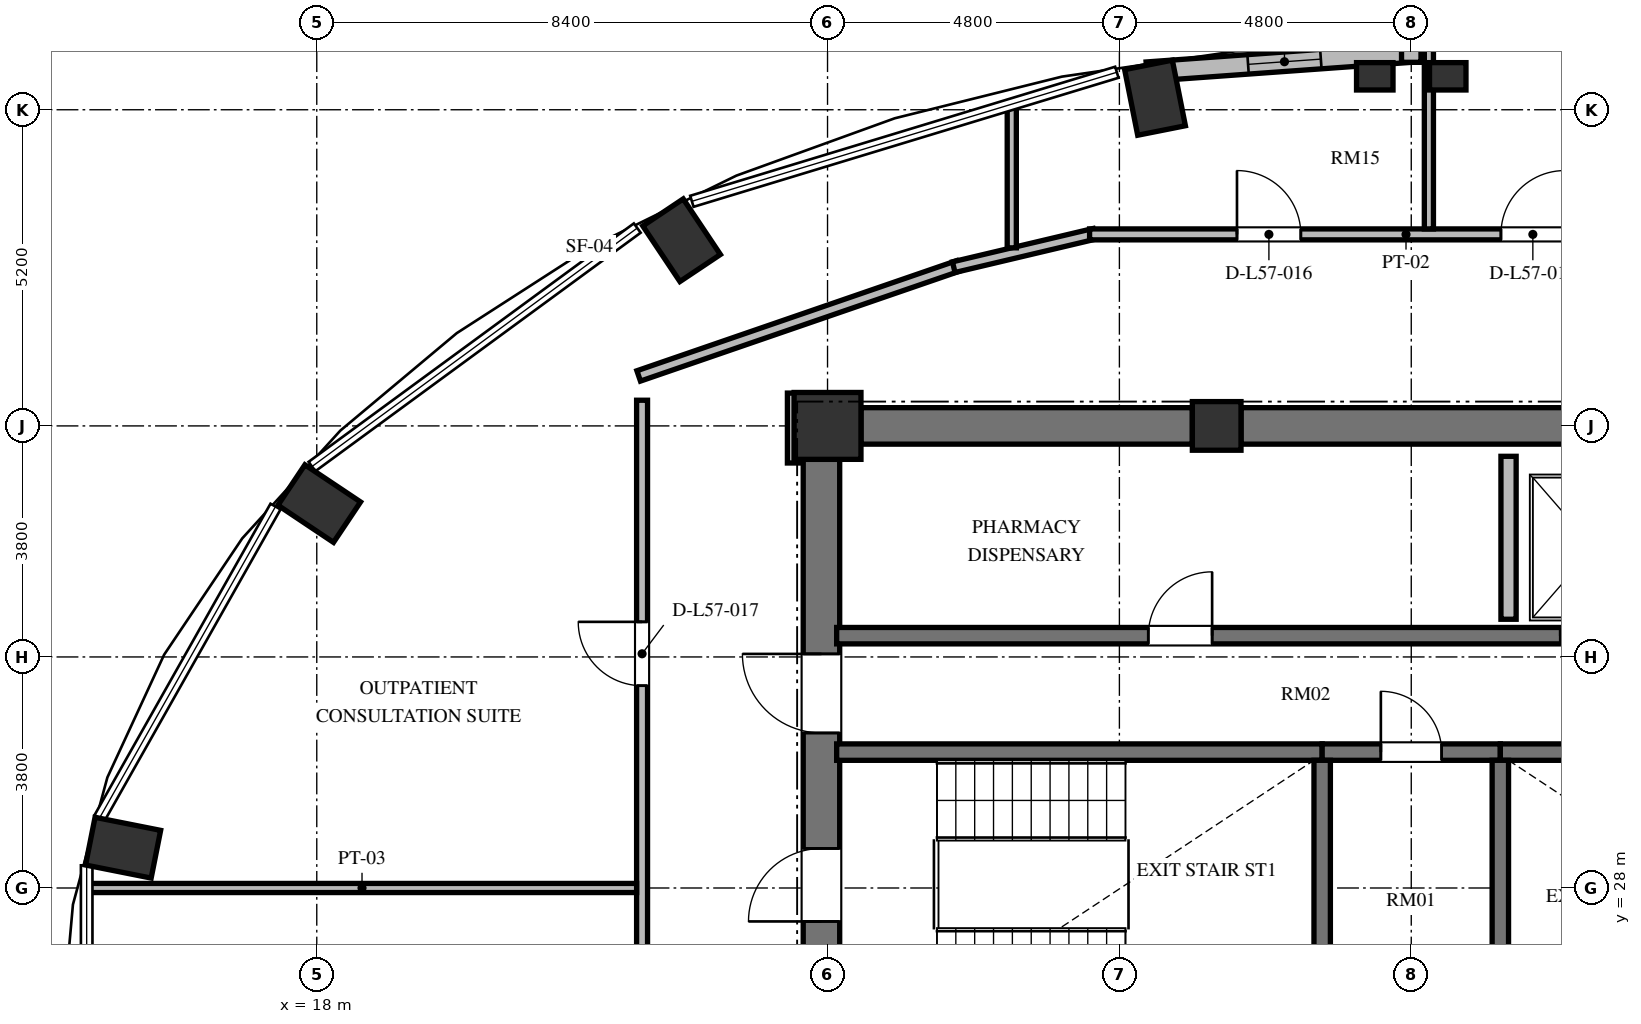
"""IFC4 building model, lengths in metres.
Left out: names, types, materials, properties, quantities, classifications, styles, units other than length and angle.
Written with IfcOpenShell. Run it as: python <this file> out.ifc"""

import sys

from ifc_helpers import new_model, si_unit, direction, frame, frame_2d, origin, origin_2d, place, context, subcontext, project, spatial, rectangle, extrude, element, fill, save


model = new_model("IFC4")
c1 = context("Model", 3, precision=1e-05, world=origin(), true_north=direction((0.0, 1.0)))
c2 = subcontext(c1, "Body", "Model", "MODEL_VIEW")
j1 = project(units=[si_unit("LENGTHUNIT", "METRE"), si_unit("PLANEANGLEUNIT", "RADIAN")], contexts=[c1])
p1 = place(None, origin())
s1 = spatial("IfcSite", under=j1, at=p1, CompositionType="ELEMENT")
p2 = place(p1, origin())
s2 = spatial("IfcBuilding", under=s1, at=p2, CompositionType="ELEMENT")
p3 = place(p2, frame((0.0, 0.0, 220.368)))
s3 = spatial("IfcBuildingStorey", under=s2, at=p3, CompositionType="ELEMENT", Elevation=220.368)
for number, where, z_axis, x_axis in (
    (1, (31.786, 40.998, 0.0), (0.0, 0.0, 1.0), (-0.195, 0.981, 0.0)),
    (2, (24.0, 38.654, 0.0), (0.0, 0.0, 1.0), (-0.556, 0.831, 0.0)),
    (3, (18.04, 34.323, 0.0), (0.0, 0.0, 1.0), (-0.831, 0.556, 0.0)),
    (4, (14.815, 28.663, 0.0), (0.0, 0.0, 1.0), (-0.981, 0.195, 0.0)),
):
    element("IfcColumn", number, at=place(p3, frame(where, z_axis=z_axis, x_axis=x_axis)), inside=s3, PredefinedType="COLUMN", context=c2, shape_type="SweptSolid", body=[
        extrude(rectangle(XDim=1.1, YDim=0.8, at=origin_2d()), origin(), (0.0, 0.0, 1.0), 3.648),
    ])
p4 = place(p3, frame((32.8, 35.6, 0.0), z_axis=(0.0, 0.0, 1.0), x_axis=(1.0, 0.0, 0.0)))
e5 = element("IfcColumn", 5, at=p4, inside=s3, PredefinedType="COLUMN", context=c2, shape_type="SweptSolid", body=[
    extrude(rectangle(XDim=0.8, YDim=0.8, at=origin_2d()), origin(), (0.0, 0.0, 1.0), 3.648),
])
p5 = place(p3, frame((26.4, 35.6, 0.0), z_axis=(0.0, 0.0, 1.0), x_axis=(1.0, 0.0, 0.0)))
e6 = element("IfcColumn", 6, at=p5, inside=s3, PredefinedType="COLUMN", context=c2, shape_type="SweptSolid", body=[
    extrude(rectangle(XDim=1.1, YDim=1.1, at=origin_2d()), origin(), (0.0, 0.0, 1.0), 3.648),
])
for number, where, z_axis, x_axis in (
    (7, (35.4, 41.35, 0.0), (0.0, 0.0, 1.0), (1.0, 0.0, 0.0)),
    (8, (36.6, 41.35, 0.0), (0.0, 0.0, 1.0), (1.0, 0.0, 0.0)),
):
    element("IfcColumn", number, at=place(p3, frame(where, z_axis=z_axis, x_axis=x_axis)), inside=s3, PredefinedType="PILASTER", context=c2, shape_type="SweptSolid", body=[
        extrude(rectangle(XDim=0.6, YDim=0.45, at=origin_2d()), origin(), (0.0, 0.0, 1.0), 3.648),
    ])
p6 = place(p3, frame((26.3, 20.95, 0.0), z_axis=(0.0, 0.0, 1.0), x_axis=(0.0, 1.0, 0.0)))
e9 = element("IfcWall", 9, at=p6, inside=s3, PredefinedType="SHEAR", context=c2, shape_type="SweptSolid", body=[
    extrude(rectangle(XDim=14.1, YDim=0.6, at=frame_2d((7.05, 0.0))), origin(), (0.0, 0.0, 1.0), 3.648),
])
p7 = place(p6, frame((6.5, 0.0, 0.0)))
e10 = element("IfcOpeningElement", 10, at=p7, cuts=e9, PredefinedType="OPENING", context=c2, shape_type="SweptSolid", body=[
    extrude(rectangle(XDim=1.2, YDim=2.15, at=frame_2d((0.6, 1.075))), frame((0.0, 0.31, 0.0), z_axis=(0.0, -1.0, 0.0), x_axis=(1.0, 0.0, 0.0)), (0.0, 0.0, 1.0), 0.62),
])
p8 = place(p6, frame((9.6, 0.0, 0.0)))
e11 = element("IfcOpeningElement", 11, at=p8, cuts=e9, PredefinedType="OPENING", context=c2, shape_type="SweptSolid", body=[
    extrude(rectangle(XDim=1.3, YDim=2.2, at=frame_2d((0.65, 1.1))), frame((0.0, 0.31, 0.0), z_axis=(0.0, -1.0, 0.0), x_axis=(1.0, 0.0, 0.0)), (0.0, 0.0, 1.0), 0.62),
])
p9 = place(p6, frame((3.26, 0.0, 0.0)))
e12 = element("IfcOpeningElement", 12, at=p9, cuts=e9, PredefinedType="OPENING", context=c2, shape_type="SweptSolid", body=[
    extrude(rectangle(XDim=1.3, YDim=2.2, at=frame_2d((0.65, 1.1))), frame((0.0, 0.31, 0.0), z_axis=(0.0, -1.0, 0.0), x_axis=(1.0, 0.0, 0.0)), (0.0, 0.0, 1.0), 0.62),
])
p10 = place(p3, frame((26.95, 35.6, 0.0), z_axis=(0.0, 0.0, 1.0), x_axis=(1.0, 0.0, 0.0)))
e13 = element("IfcWall", 13, at=p10, inside=s3, PredefinedType="SHEAR", context=c2, shape_type="SweptSolid", body=[
    extrude(rectangle(XDim=5.45, YDim=0.6, at=frame_2d((2.725, 0.0))), origin(), (0.0, 0.0, 1.0), 3.648),
])
p11 = place(p3, frame((33.2, 35.6, 0.0), z_axis=(0.0, 0.0, 1.0), x_axis=(1.0, 0.0, 0.0)))
e14 = element("IfcWall", 14, at=p11, inside=s3, PredefinedType="SHEAR", context=c2, shape_type="SweptSolid", body=[
    extrude(rectangle(XDim=5.6, YDim=0.6, at=frame_2d((2.8, 0.0))), origin(), (0.0, 0.0, 1.0), 3.648),
])
p12 = place(p3, frame((36.179, 41.753, 0.0), z_axis=(0.0, 0.0, 1.0), x_axis=(-0.997408782787, -0.071942477163, 0.0)))
e15 = element("IfcWall", 15, at=p12, inside=s3, PredefinedType="SOLIDWALL", context=c2, shape_type="SweptSolid", body=[
    extrude(rectangle(XDim=4.541, YDim=0.32, at=frame_2d((2.27, 0.0))), origin(), (0.0, 0.0, 1.0), 3.448),
])
p13 = place(p12, frame((1.67, 0.0, 0.85)))
e16 = element("IfcOpeningElement", 16, at=p13, cuts=e15, PredefinedType="OPENING", context=c2, shape_type="SweptSolid", body=[
    extrude(rectangle(XDim=1.2, YDim=1.8, at=frame_2d((0.6, 0.9))), frame((0.0, 0.17, 0.0), z_axis=(0.0, -1.0, 0.0), x_axis=(1.0, 0.0, 0.0)), (0.0, 0.0, 1.0), 0.34),
])
p14 = place(p3, frame((36.0, 46.7, 0.0), z_axis=(0.0, 0.0, 1.0), x_axis=(0.0, -1.0, 0.0)))
e17 = element("IfcWall", 17, at=p14, inside=s3, PredefinedType="SOLIDWALL", context=c2, shape_type="SweptSolid", body=[
    extrude(rectangle(XDim=5.12, YDim=0.32, at=frame_2d((2.56, 0.0))), origin(), (0.0, 0.0, 1.0), 3.448),
])
p15 = place(p14, frame((1.36, 0.0, 0.84)))
e18 = element("IfcOpeningElement", 18, at=p15, cuts=e17, PredefinedType="OPENING", context=c2, shape_type="SweptSolid", body=[
    extrude(rectangle(XDim=2.4, YDim=2.04, at=frame_2d((1.2, 1.02))), frame((0.0, 0.17, 0.0), z_axis=(0.0, -1.0, 0.0), x_axis=(1.0, 0.0, 0.0)), (0.0, 0.0, 1.0), 0.34),
])
p16 = place(p3, frame((26.55, 30.235, 0.0), z_axis=(0.0, 0.0, 1.0), x_axis=(1.0, 0.0, 0.0)))
e19 = element("IfcWall", 19, at=p16, inside=s3, PredefinedType="SHEAR", context=c2, shape_type="SweptSolid", body=[
    extrude(rectangle(XDim=7.985, YDim=0.27, at=frame_2d((3.992, 0.0))), origin(), (0.0, 0.0, 1.0), 3.648),
])
p17 = place(p3, frame((34.535, 30.235, 0.0), z_axis=(0.0, 0.0, 1.0), x_axis=(1.0, 0.0, 0.0)))
e20 = element("IfcWall", 20, at=p17, inside=s3, PredefinedType="SHEAR", context=c2, shape_type="SweptSolid", body=[
    extrude(rectangle(XDim=2.93, YDim=0.27, at=frame_2d((1.465, 0.0))), origin(), (0.0, 0.0, 1.0), 3.648),
])
p18 = place(p17, frame((0.965, 0.0, 0.0)))
e21 = element("IfcOpeningElement", 21, at=p18, cuts=e20, PredefinedType="OPENING", context=c2, shape_type="SweptSolid", body=[
    extrude(rectangle(XDim=1.0, YDim=2.1, at=frame_2d((0.5, 1.05))), frame((0.0, 0.145, 0.0), z_axis=(0.0, -1.0, 0.0), x_axis=(1.0, 0.0, 0.0)), (0.0, 0.0, 1.0), 0.29),
])
p19 = place(p3, frame((37.465, 30.235, 0.0), z_axis=(0.0, 0.0, 1.0), x_axis=(1.0, 0.0, 0.0)))
e22 = element("IfcWall", 22, at=p19, inside=s3, PredefinedType="SHEAR", context=c2, shape_type="SweptSolid", body=[
    extrude(rectangle(XDim=7.985, YDim=0.27, at=frame_2d((3.992, 0.0))), origin(), (0.0, 0.0, 1.0), 3.648),
])
p20 = place(p19, frame((6.455, 0.0, 0.0)))
e23 = element("IfcOpeningElement", 23, at=p20, cuts=e22, PredefinedType="OPENING", context=c2, shape_type="SweptSolid", body=[
    extrude(rectangle(XDim=1.2, YDim=2.15, at=frame_2d((0.6, 1.075))), frame((0.0, 0.145, 0.0), z_axis=(0.0, -1.0, 0.0), x_axis=(1.0, 0.0, 0.0)), (0.0, 0.0, 1.0), 0.29),
])
for number, where, z_axis, x_axis in (
    (24, (34.535, 26.02, 0.0), (0.0, 0.0, 1.0), (0.0, 1.0, 0.0)),
    (25, (37.465, 26.02, 0.0), (0.0, 0.0, 1.0), (0.0, 1.0, 0.0)),
):
    element("IfcWall", number, at=place(p3, frame(where, z_axis=z_axis, x_axis=x_axis)), inside=s3, PredefinedType="SHEAR", context=c2, shape_type="SweptSolid", body=[
        extrude(rectangle(XDim=4.08, YDim=0.27, at=frame_2d((2.04, 0.0))), origin(), (0.0, 0.0, 1.0), 3.648),
    ])
p21 = place(p3, frame((26.55, 32.15, 0.0), z_axis=(0.0, 0.0, 1.0), x_axis=(1.0, 0.0, 0.0)))
e26 = element("IfcWall", 26, at=p21, inside=s3, PredefinedType="SHEAR", context=c2, shape_type="SweptSolid", body=[
    extrude(rectangle(XDim=16.4, YDim=0.27, at=frame_2d((8.2, 0.0))), origin(), (0.0, 0.0, 1.0), 3.648),
])
p22 = place(p21, frame((5.125, 0.0, 0.0)))
e27 = element("IfcOpeningElement", 27, at=p22, cuts=e26, PredefinedType="OPENING", context=c2, shape_type="SweptSolid", body=[
    extrude(rectangle(XDim=1.05, YDim=2.15, at=frame_2d((0.525, 1.075))), frame((0.0, 0.145, 0.0), z_axis=(0.0, -1.0, 0.0), x_axis=(1.0, 0.0, 0.0)), (0.0, 0.0, 1.0), 0.29),
])
p23 = place(p21, frame((11.9, 0.0, 0.0)))
e28 = element("IfcOpeningElement", 28, at=p23, cuts=e26, PredefinedType="OPENING", context=c2, shape_type="SweptSolid", body=[
    extrude(rectangle(XDim=1.1, YDim=2.2, at=frame_2d((0.55, 1.1))), frame((0.0, 0.145, 0.0), z_axis=(0.0, -1.0, 0.0), x_axis=(1.0, 0.0, 0.0)), (0.0, 0.0, 1.0), 0.29),
])
p24 = place(p21, frame((14.5, 0.0, 0.0)))
e29 = element("IfcOpeningElement", 29, at=p24, cuts=e26, PredefinedType="OPENING", context=c2, shape_type="SweptSolid", body=[
    extrude(rectangle(XDim=1.1, YDim=2.2, at=frame_2d((0.55, 1.1))), frame((0.0, 0.145, 0.0), z_axis=(0.0, -1.0, 0.0), x_axis=(1.0, 0.0, 0.0)), (0.0, 0.0, 1.0), 0.29),
])
p25 = place(p3, frame((37.6, 32.42, 0.0), z_axis=(0.0, 0.0, 1.0), x_axis=(0.0, 1.0, 0.0)))
e30 = element("IfcWall", 30, at=p25, inside=s3, PredefinedType="SOLIDWALL", context=c2, shape_type="SweptSolid", body=[
    extrude(rectangle(XDim=2.68, YDim=0.25, at=frame_2d((1.34, 0.0))), origin(), (0.0, 0.0, 1.0), 3.448),
])
p26 = place(p3, frame((23.294, 36.422, 0.0), z_axis=(0.0, 0.0, 1.0), x_axis=(0.945493277461, 0.325641616316, 0.0)))
e31 = element("IfcWall", 31, at=p26, inside=s3, PredefinedType="PARTITIONING", context=c2, shape_type="SweptSolid", body=[
    extrude(rectangle(XDim=5.562, YDim=0.18, at=frame_2d((2.781, 0.0))), origin(), (0.0, 0.0, 1.0), 3.073),
])
p27 = place(p3, frame((28.476, 38.211, 0.0), z_axis=(0.0, 0.0, 1.0), x_axis=(0.973030562203, 0.230676234189, 0.0)))
e32 = element("IfcWall", 32, at=p27, inside=s3, PredefinedType="PARTITIONING", context=c2, shape_type="SweptSolid", body=[
    extrude(rectangle(XDim=2.377, YDim=0.18, at=frame_2d((1.188, 0.0))), origin(), (0.0, 0.0, 1.0), 3.448),
])
p28 = place(p3, frame((30.71, 38.75, 0.0), z_axis=(0.0, 0.0, 1.0), x_axis=(1.0, 0.0, 0.0)))
e33 = element("IfcWall", 33, at=p28, inside=s3, PredefinedType="PARTITIONING", context=c2, shape_type="SweptSolid", body=[
    extrude(rectangle(XDim=20.815, YDim=0.18, at=frame_2d((10.408, 0.0))), origin(), (0.0, 0.0, 1.0), 3.073),
])
p29 = place(p28, frame((17.654, 0.0, 0.0)))
e34 = element("IfcOpeningElement", 34, at=p29, cuts=e33, PredefinedType="OPENING", context=c2, shape_type="SweptSolid", body=[
    extrude(rectangle(XDim=1.05, YDim=2.15, at=frame_2d((0.525, 1.075))), frame((0.0, 0.1, 0.0), z_axis=(0.0, -1.0, 0.0), x_axis=(1.0, 0.0, 0.0)), (0.0, 0.0, 1.0), 0.2),
])
p30 = place(p28, frame((13.62, 0.0, 0.0)))
e35 = element("IfcOpeningElement", 35, at=p30, cuts=e33, PredefinedType="OPENING", context=c2, shape_type="SweptSolid", body=[
    extrude(rectangle(XDim=1.05, YDim=2.15, at=frame_2d((0.525, 1.075))), frame((0.0, 0.1, 0.0), z_axis=(0.0, -1.0, 0.0), x_axis=(1.0, 0.0, 0.0)), (0.0, 0.0, 1.0), 0.2),
])
p31 = place(p28, frame((10.19, 0.0, 0.0)))
e36 = element("IfcOpeningElement", 36, at=p31, cuts=e33, PredefinedType="OPENING", context=c2, shape_type="SweptSolid", body=[
    extrude(rectangle(XDim=1.05, YDim=2.15, at=frame_2d((0.525, 1.075))), frame((0.0, 0.1, 0.0), z_axis=(0.0, -1.0, 0.0), x_axis=(1.0, 0.0, 0.0)), (0.0, 0.0, 1.0), 0.2),
])
p32 = place(p28, frame((6.765, 0.0, 0.0)))
e37 = element("IfcOpeningElement", 37, at=p32, cuts=e33, PredefinedType="OPENING", context=c2, shape_type="SweptSolid", body=[
    extrude(rectangle(XDim=1.05, YDim=2.15, at=frame_2d((0.525, 1.075))), frame((0.0, 0.1, 0.0), z_axis=(0.0, -1.0, 0.0), x_axis=(1.0, 0.0, 0.0)), (0.0, 0.0, 1.0), 0.2),
])
p33 = place(p28, frame((2.424, 0.0, 0.0)))
e38 = element("IfcOpeningElement", 38, at=p33, cuts=e33, PredefinedType="OPENING", context=c2, shape_type="SweptSolid", body=[
    extrude(rectangle(XDim=1.05, YDim=2.15, at=frame_2d((0.525, 1.075))), frame((0.0, 0.1, 0.0), z_axis=(0.0, -1.0, 0.0), x_axis=(1.0, 0.0, 0.0)), (0.0, 0.0, 1.0), 0.2),
])
p34 = place(p3, frame((25.83, 36.14, 0.0), z_axis=(0.0, 0.0, 1.0), x_axis=(0.0, -1.0, 0.0)))
e39 = element("IfcWall", 39, at=p34, inside=s3, PredefinedType="PARTITIONING", context=c2, shape_type="SweptSolid", body=[
    extrude(rectangle(XDim=1.15, YDim=0.18, at=frame_2d((0.575, 0.0))), origin(), (0.0, 0.0, 1.0), 3.448),
])
p35 = place(p3, frame((23.35, 19.98, 0.0), z_axis=(0.0, 0.0, 1.0), x_axis=(0.0, 1.0, 0.0)))
e40 = element("IfcWall", 40, at=p35, inside=s3, PredefinedType="PARTITIONING", context=c2, shape_type="SweptSolid", body=[
    extrude(rectangle(XDim=16.042, YDim=0.18, at=frame_2d((8.021, 0.0))), origin(), (0.0, 0.0, 1.0), 3.448),
])
p36 = place(p35, frame((3.469, 0.0, 0.0)))
e41 = element("IfcOpeningElement", 41, at=p36, cuts=e40, PredefinedType="OPENING", context=c2, shape_type="SweptSolid", body=[
    extrude(rectangle(XDim=1.4, YDim=2.2, at=frame_2d((0.7, 1.1))), frame((0.0, 0.1, 0.0), z_axis=(0.0, -1.0, 0.0), x_axis=(1.0, 0.0, 0.0)), (0.0, 0.0, 1.0), 0.2),
])
p37 = place(p35, frame((11.347, 0.0, 0.0)))
e42 = element("IfcOpeningElement", 42, at=p37, cuts=e40, PredefinedType="OPENING", context=c2, shape_type="SweptSolid", body=[
    extrude(rectangle(XDim=1.05, YDim=2.15, at=frame_2d((0.525, 1.075))), frame((0.0, 0.1, 0.0), z_axis=(0.0, -1.0, 0.0), x_axis=(1.0, 0.0, 0.0)), (0.0, 0.0, 1.0), 0.2),
])
p38 = place(p3, frame((14.228, 28.0, 0.0), z_axis=(0.0, 0.0, 1.0), x_axis=(1.0, 0.0, 0.0)))
e43 = element("IfcWall", 43, at=p38, inside=s3, PredefinedType="PARTITIONING", context=c2, shape_type="SweptSolid", body=[
    extrude(rectangle(XDim=9.032, YDim=0.15, at=frame_2d((4.516, 0.0))), origin(), (0.0, 0.0, 1.0), 3.448),
])
p39 = place(p3, frame((29.43, 38.529, 0.0), z_axis=(0.0, 0.0, 1.0), x_axis=(0.0, 1.0, 0.0)))
e44 = element("IfcWall", 44, at=p39, inside=s3, PredefinedType="PARTITIONING", context=c2, shape_type="SweptSolid", body=[
    extrude(rectangle(XDim=2.346, YDim=0.15, at=frame_2d((1.173, 0.0))), origin(), (0.0, 0.0, 1.0), 3.448),
])
p40 = place(p3, frame((36.29, 38.84, 0.0), z_axis=(0.0, 0.0, 1.0), x_axis=(0.0, 1.0, 0.0)))
e45 = element("IfcWall", 45, at=p40, inside=s3, PredefinedType="PARTITIONING", context=c2, shape_type="SweptSolid", body=[
    extrude(rectangle(XDim=7.647, YDim=0.15, at=frame_2d((3.824, 0.0))), origin(), (0.0, 0.0, 1.0), 3.448),
])
p41 = place(p13, origin())
e46 = element("IfcWindow", 46, at=p41, inside=s3, PartitioningType="SINGLE_PANEL", PredefinedType="WINDOW", context=c2, shape_type="SweptSolid", body=[
    extrude(rectangle(XDim=1.2, YDim=1.8, at=frame_2d((0.6, 0.9))), frame((0.0, 0.03, 0.0), z_axis=(0.0, -1.0, 0.0), x_axis=(1.0, 0.0, 0.0)), (0.0, 0.0, 1.0), 0.06),
])
fill(e16, e46)
p42 = place(p7, origin())
e47 = element("IfcDoor", 47, at=p42, inside=s3, OperationType="SINGLE_SWING_LEFT", PredefinedType="DOOR", context=c2, shape_type="SweptSolid", body=[
    extrude(rectangle(XDim=1.2, YDim=2.15, at=frame_2d((0.6, 1.075))), frame((0.0, 0.025, 0.0), z_axis=(0.0, -1.0, 0.0), x_axis=(1.0, 0.0, 0.0)), (0.0, 0.0, 1.0), 0.05),
])
fill(e10, e47)
p43 = place(p18, origin())
e48 = element("IfcDoor", 48, at=p43, inside=s3, OperationType="SINGLE_SWING_LEFT", PredefinedType="DOOR", context=c2, shape_type="SweptSolid", body=[
    extrude(rectangle(XDim=1.0, YDim=2.1, at=frame_2d((0.5, 1.05))), frame((0.0, 0.025, 0.0), z_axis=(0.0, -1.0, 0.0), x_axis=(1.0, 0.0, 0.0)), (0.0, 0.0, 1.0), 0.05),
])
fill(e21, e48)
p44 = place(p8, origin())
e49 = element("IfcDoor", 49, at=p44, inside=s3, OperationType="SINGLE_SWING_RIGHT", PredefinedType="DOOR", context=c2, shape_type="SweptSolid", body=[
    extrude(rectangle(XDim=1.3, YDim=2.2, at=frame_2d((0.65, 1.1))), frame((0.0, 0.025, 0.0), z_axis=(0.0, -1.0, 0.0), x_axis=(1.0, 0.0, 0.0)), (0.0, 0.0, 1.0), 0.05),
])
fill(e11, e49)
p45 = place(p22, origin())
e50 = element("IfcDoor", 50, at=p45, inside=s3, OperationType="SINGLE_SWING_RIGHT", PredefinedType="DOOR", context=c2, shape_type="SweptSolid", body=[
    extrude(rectangle(XDim=1.05, YDim=2.15, at=frame_2d((0.525, 1.075))), frame((0.0, 0.025, 0.0), z_axis=(0.0, -1.0, 0.0), x_axis=(1.0, 0.0, 0.0)), (0.0, 0.0, 1.0), 0.05),
])
fill(e27, e50)
p46 = place(p23, origin())
e51 = element("IfcDoor", 51, at=p46, inside=s3, OperationType="SLIDING_TO_LEFT", PredefinedType="DOOR", context=c2, shape_type="SweptSolid", body=[
    extrude(rectangle(XDim=1.1, YDim=2.2, at=frame_2d((0.55, 1.1))), frame((0.0, 0.025, 0.0), z_axis=(0.0, -1.0, 0.0), x_axis=(1.0, 0.0, 0.0)), (0.0, 0.0, 1.0), 0.05),
])
fill(e28, e51)
p47 = place(p32, origin())
e52 = element("IfcDoor", 52, at=p47, inside=s3, OperationType="SINGLE_SWING_RIGHT", PredefinedType="DOOR", context=c2, shape_type="SweptSolid", body=[
    extrude(rectangle(XDim=1.05, YDim=2.15, at=frame_2d((0.525, 1.075))), frame((0.0, 0.025, 0.0), z_axis=(0.0, -1.0, 0.0), x_axis=(1.0, 0.0, 0.0)), (0.0, 0.0, 1.0), 0.05),
])
fill(e37, e52)
p48 = place(p33, origin())
e53 = element("IfcDoor", 53, at=p48, inside=s3, OperationType="SINGLE_SWING_LEFT", PredefinedType="DOOR", context=c2, shape_type="SweptSolid", body=[
    extrude(rectangle(XDim=1.05, YDim=2.15, at=frame_2d((0.525, 1.075))), frame((0.0, 0.025, 0.0), z_axis=(0.0, -1.0, 0.0), x_axis=(1.0, 0.0, 0.0)), (0.0, 0.0, 1.0), 0.05),
])
fill(e38, e53)
p49 = place(p37, origin())
e54 = element("IfcDoor", 54, at=p49, inside=s3, OperationType="SINGLE_SWING_RIGHT", PredefinedType="DOOR", context=c2, shape_type="SweptSolid", body=[
    extrude(rectangle(XDim=1.05, YDim=2.15, at=frame_2d((0.525, 1.075))), frame((0.0, 0.025, 0.0), z_axis=(0.0, -1.0, 0.0), x_axis=(1.0, 0.0, 0.0)), (0.0, 0.0, 1.0), 0.05),
])
fill(e42, e54)
save(model, sys.argv[1])
